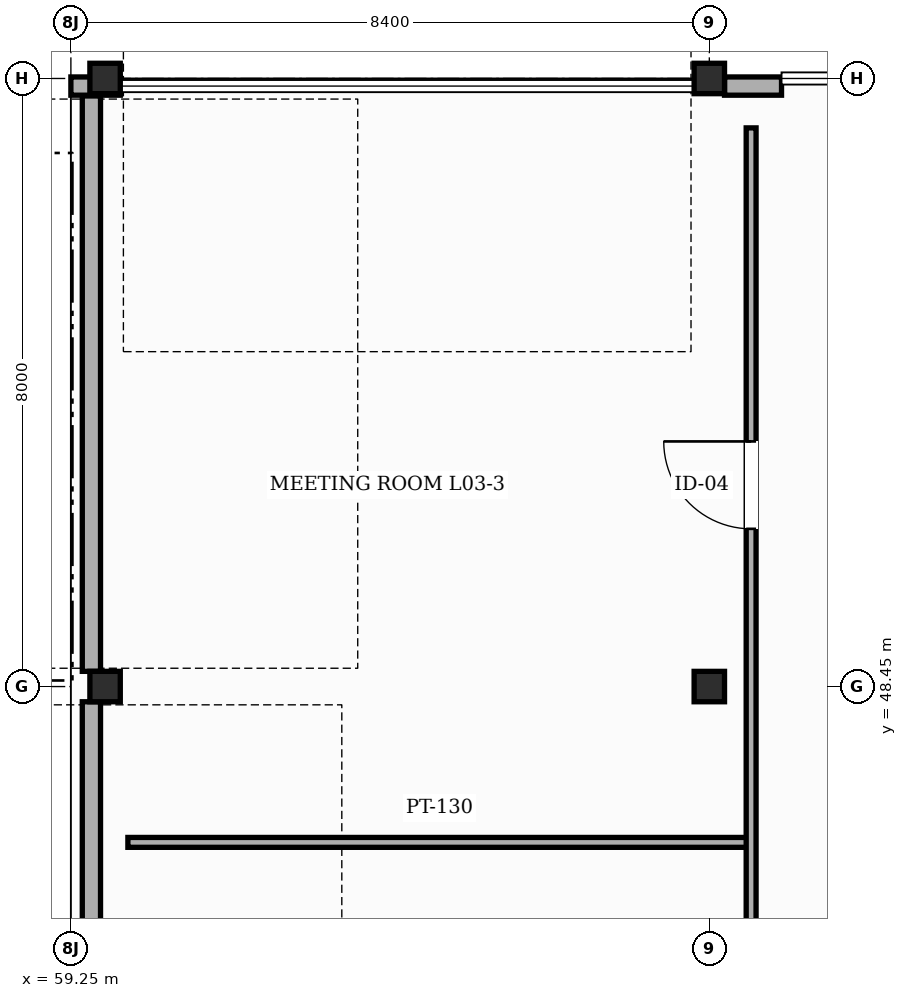
"""IFC4 building model, lengths in metres.
Left out: names, types, materials, properties, quantities, classifications, styles, units other than length and angle.
Written with IfcOpenShell. Run it as: python <this file> out.ifc"""

import sys

from ifc_helpers import new_model, si_unit, direction, frame, frame_2d, origin, origin_2d, place, context, subcontext, project, spatial, rectangle, i_section, extrude, element, fill, save


model = new_model("IFC4")
c1 = context("Model", 3, precision=1e-05, world=origin(), true_north=direction((0.0, 1.0)))
c2 = subcontext(c1, "Body", "Model", "MODEL_VIEW")
j1 = project(units=[si_unit("LENGTHUNIT", "METRE"), si_unit("PLANEANGLEUNIT", "RADIAN")], contexts=[c1])
p1 = place(None, origin())
s1 = spatial("IfcSite", under=j1, at=p1, CompositionType="ELEMENT")
p2 = place(p1, origin())
s2 = spatial("IfcBuilding", under=s1, at=p2, CompositionType="ELEMENT")
p3 = place(p2, frame((0.0, 0.0, 15.0)))
s3 = spatial("IfcBuildingStorey", under=s2, at=p3, CompositionType="ELEMENT", Elevation=15.0)
for number, where, z_axis, x_axis in (
    (1, (59.7, 48.45, 0.0), (0.0, 0.0, 1.0), (1.0, 0.0, 0.0)),
    (2, (59.7, 56.45, 0.0), (0.0, 0.0, 1.0), (1.0, 0.0, 0.0)),
    (3, (67.65, 48.45, 0.0), (0.0, 0.0, 1.0), (1.0, 0.0, 0.0)),
    (4, (67.65, 56.45, 0.0), (0.0, 0.0, 1.0), (1.0, 0.0, 0.0)),
):
    element("IfcColumn", number, at=place(p3, frame(where, z_axis=z_axis, x_axis=x_axis)), inside=s3, PredefinedType="COLUMN", context=c2, shape_type="SweptSolid", body=[
        extrude(i_section(OverallWidth=0.4, OverallDepth=0.4, WebThickness=0.013, FlangeThickness=0.021, FilletRadius=0.022, at=origin_2d()), origin(), (0.0, 0.0, 1.0), 4.8),
    ])
p4 = place(p3, frame((59.25, 56.35, 0.0), z_axis=(0.0, 0.0, 1.0), x_axis=(1.0, 0.0, 0.0)))
e5 = element("IfcWall", 5, at=p4, inside=s3, PredefinedType="SOLIDWALL", context=c2, shape_type="SweptSolid", body=[
    extrude(rectangle(XDim=0.65, YDim=0.24, at=frame_2d((0.325, 0.0))), origin(), (0.0, 0.0, 1.0), 4.545),
])
p5 = place(p3, frame((67.85, 56.35, 0.0), z_axis=(0.0, 0.0, 1.0), x_axis=(1.0, 0.0, 0.0)))
e6 = element("IfcWall", 6, at=p5, inside=s3, PredefinedType="SOLIDWALL", context=c2, shape_type="SweptSolid", body=[
    extrude(rectangle(XDim=0.75, YDim=0.24, at=frame_2d((0.375, 0.0))), origin(), (0.0, 0.0, 1.0), 3.135),
])
p6 = place(p3, frame((59.52, 41.1, 0.0), z_axis=(0.0, 0.0, 1.0), x_axis=(0.0, 1.0, 0.0)))
e7 = element("IfcWall", 7, at=p6, inside=s3, PredefinedType="SOLIDWALL", context=c2, shape_type="SweptSolid", body=[
    extrude(rectangle(XDim=7.15, YDim=0.24, at=frame_2d((3.575, 0.0))), origin(), (0.0, 0.0, 1.0), 3.885),
])
p7 = place(p3, frame((59.52, 48.65, 0.0), z_axis=(0.0, 0.0, 1.0), x_axis=(0.0, 1.0, 0.0)))
e8 = element("IfcWall", 8, at=p7, inside=s3, PredefinedType="SOLIDWALL", context=c2, shape_type="SweptSolid", body=[
    extrude(rectangle(XDim=7.57, YDim=0.24, at=frame_2d((3.785, 0.0))), origin(), (0.0, 0.0, 1.0), 3.885),
])
p8 = place(p3, frame((60.0, 46.4, 0.0), z_axis=(0.0, 0.0, 1.0), x_axis=(1.0, 0.0, 0.0)))
e9 = element("IfcWall", 9, at=p8, inside=s3, PredefinedType="PARTITIONING", context=c2, shape_type="SweptSolid", body=[
    extrude(rectangle(XDim=8.2, YDim=0.13, at=frame_2d((4.1, 0.0))), origin(), (0.0, 0.0, 1.0), 4.545),
])
p9 = place(p3, frame((68.2, 37.0, 0.0), z_axis=(0.0, 0.0, 1.0), x_axis=(0.0, 1.0, 0.0)))
e10 = element("IfcWall", 10, at=p9, inside=s3, PredefinedType="PARTITIONING", context=c2, shape_type="SweptSolid", body=[
    extrude(rectangle(XDim=18.8, YDim=0.13, at=frame_2d((9.4, 0.0))), origin(), (0.0, 0.0, 1.0), 4.545),
])
p10 = place(p9, frame((0.12, 0.0, 0.0)))
e11 = element("IfcOpeningElement", 11, at=p10, cuts=e10, PredefinedType="OPENING", context=c2, shape_type="SweptSolid", body=[
    extrude(rectangle(XDim=1.15, YDim=2.22, at=frame_2d((0.575, 1.11))), frame((0.0, 0.075, 0.0), z_axis=(0.0, -1.0, 0.0), x_axis=(1.0, 0.0, 0.0)), (0.0, 0.0, 1.0), 0.15),
])
p11 = place(p9, frame((13.525, 0.0, 0.0)))
e12 = element("IfcOpeningElement", 12, at=p11, cuts=e10, PredefinedType="OPENING", context=c2, shape_type="SweptSolid", body=[
    extrude(rectangle(XDim=1.15, YDim=2.22, at=frame_2d((0.575, 1.11))), frame((0.0, 0.075, 0.0), z_axis=(0.0, -1.0, 0.0), x_axis=(1.0, 0.0, 0.0)), (0.0, 0.0, 1.0), 0.15),
])
p12 = place(p11, origin())
e13 = element("IfcDoor", 13, at=p12, inside=s3, OperationType="SINGLE_SWING_RIGHT", PredefinedType="DOOR", context=c2, shape_type="SweptSolid", body=[
    extrude(rectangle(XDim=1.15, YDim=2.22, at=frame_2d((0.575, 1.11))), frame((0.0, 0.025, 0.0), z_axis=(0.0, -1.0, 0.0), x_axis=(1.0, 0.0, 0.0)), (0.0, 0.0, 1.0), 0.05),
])
fill(e12, e13)
save(model, sys.argv[1])
